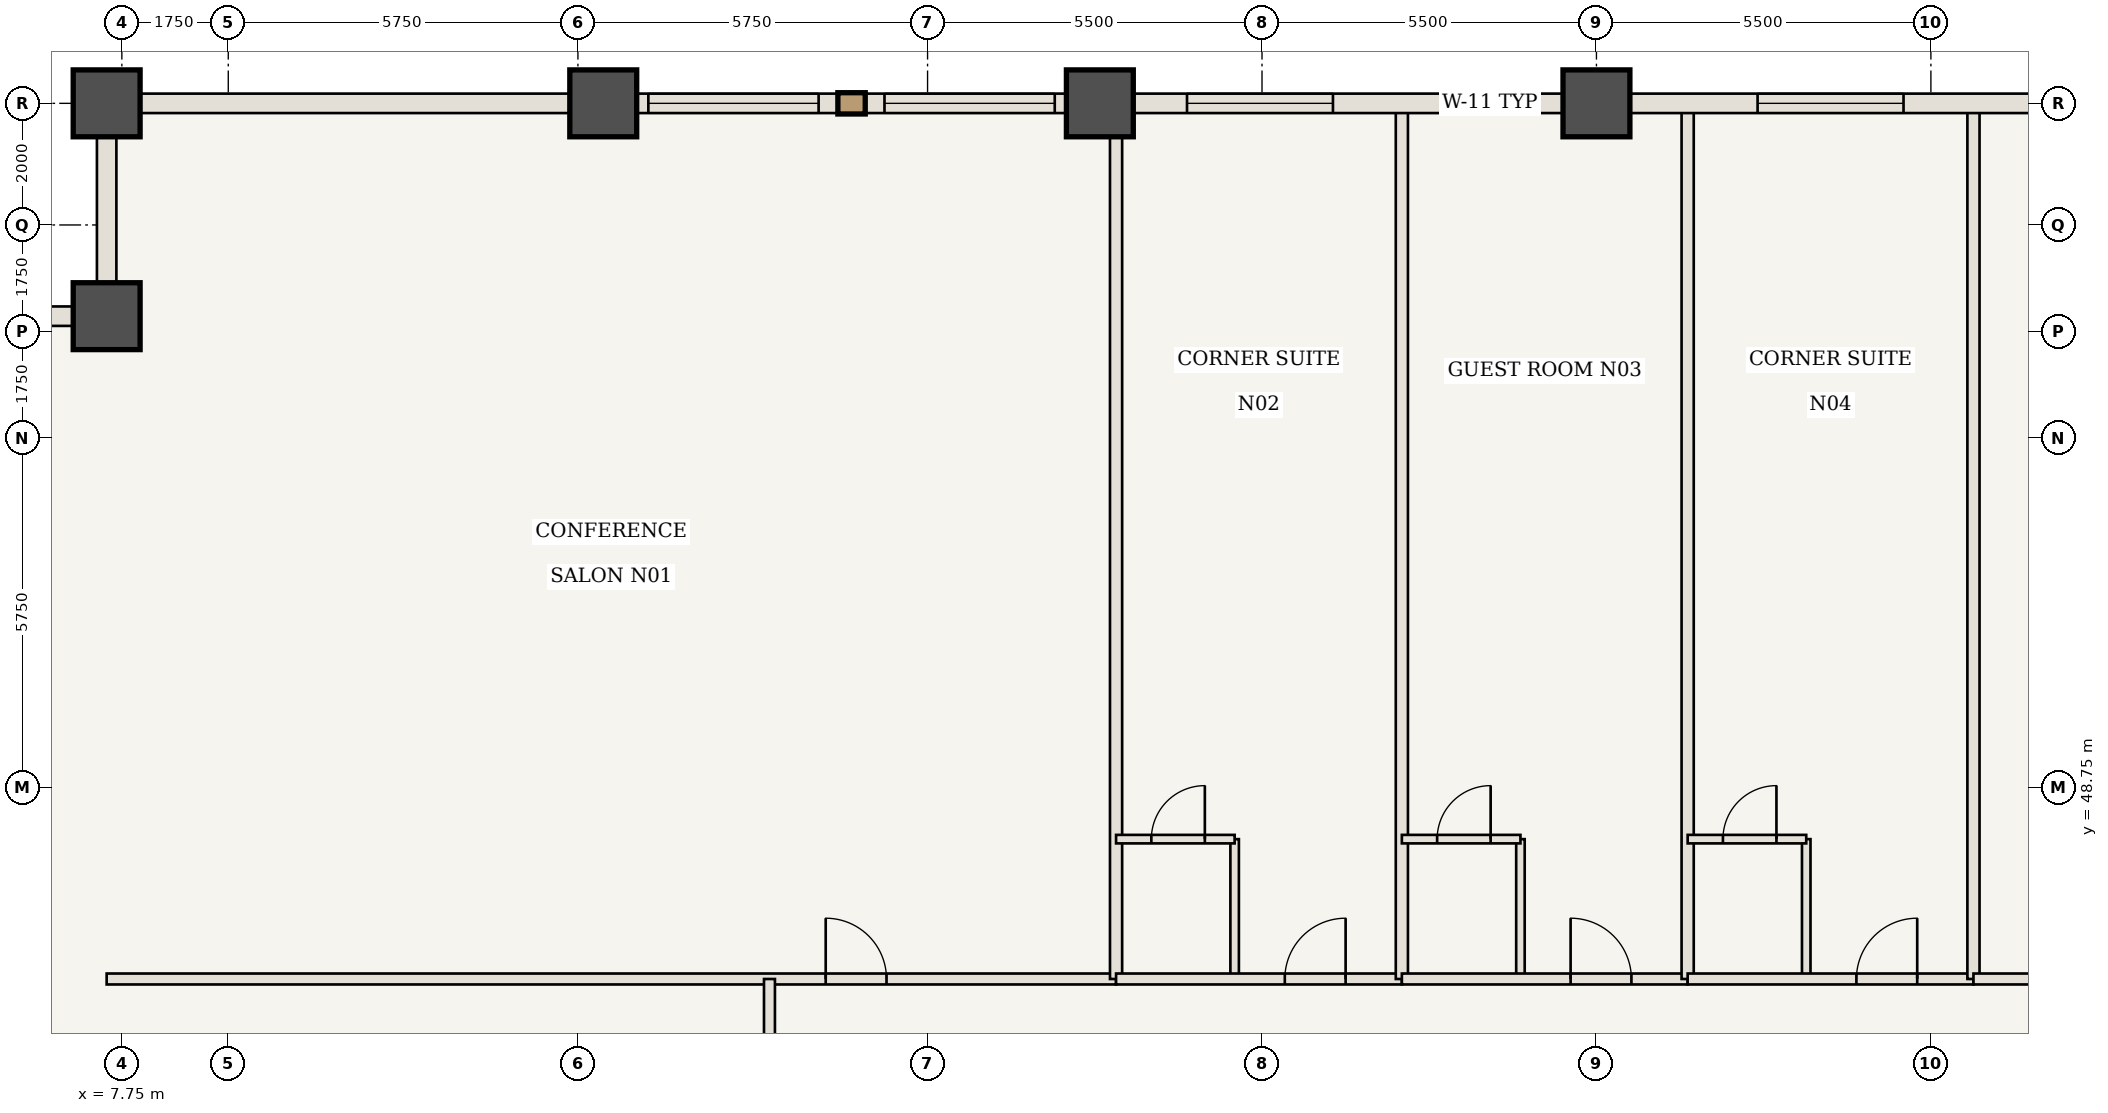
"""IFC4 building model, lengths in metres.
Left out: names, types, materials, properties, quantities, classifications, styles, units other than length and angle.
Written with IfcOpenShell. Run it as: python <this file> out.ifc"""

import sys

from ifc_helpers import new_model, si_unit, direction, frame, frame_2d, origin, origin_2d, place, context, subcontext, project, spatial, rectangle, extrude, element, fill, save


model = new_model("IFC4")
c1 = context("Model", 3, precision=1e-05, world=origin(), true_north=direction((0.0, 1.0)))
c2 = subcontext(c1, "Body", "Model", "MODEL_VIEW")
j1 = project(units=[si_unit("LENGTHUNIT", "METRE"), si_unit("PLANEANGLEUNIT", "RADIAN")], contexts=[c1])
p1 = place(None, origin())
s1 = spatial("IfcSite", under=j1, at=p1, CompositionType="ELEMENT")
p2 = place(p1, origin())
s2 = spatial("IfcBuilding", under=s1, at=p2, CompositionType="ELEMENT")
p3 = place(p2, frame((0.0, 0.0, 45.85)))
s3 = spatial("IfcBuildingStorey", under=s2, at=p3, CompositionType="ELEMENT", Elevation=45.85)
for number, where, z_axis, x_axis in (
    (1, (7.5, 60.0, 0.0), (0.0, 0.0, 1.0), (1.0, 0.0, 0.0)),
    (2, (7.5, 56.5, 0.0), (0.0, 0.0, 1.0), (1.0, 0.0, 0.0)),
    (3, (15.667, 60.0, 0.0), (0.0, 0.0, 1.0), (1.0, 0.0, 0.0)),
    (4, (23.833, 60.0, 0.0), (0.0, 0.0, 1.0), (1.0, 0.0, 0.0)),
    (5, (32.0, 60.0, 0.0), (0.0, 0.0, 1.0), (1.0, 0.0, 0.0)),
):
    element("IfcColumn", number, at=place(p3, frame(where, z_axis=z_axis, x_axis=x_axis)), inside=s3, PredefinedType="COLUMN", context=c2, shape_type="SweptSolid", body=[
        extrude(rectangle(XDim=1.1, YDim=1.1, at=origin_2d()), origin(), (0.0, 0.0, 1.0), 3.5),
    ])
p4 = place(p3, frame((7.5, 45.6, 0.0), z_axis=(0.0, 0.0, 1.0), x_axis=(1.0, 0.0, 0.0)))
e6 = element("IfcWall", 6, at=p4, inside=s3, PredefinedType="STANDARD", context=c2, shape_type="SweptSolid", body=[
    extrude(rectangle(XDim=16.6, YDim=0.18, at=frame_2d((8.3, 0.0))), origin(), (0.0, 0.0, 1.0), 3.32),
])
p5 = place(p4, frame((11.825, 0.0, 0.0)))
e7 = element("IfcOpeningElement", 7, at=p5, cuts=e6, PredefinedType="OPENING", context=c2, shape_type="SweptSolid", body=[
    extrude(rectangle(XDim=1.0, YDim=2.15, at=frame_2d((0.5, 1.075))), frame((0.0, 0.1, 0.0), z_axis=(0.0, -1.0, 0.0), x_axis=(1.0, 0.0, 0.0)), (0.0, 0.0, 1.0), 0.2),
])
p6 = place(p3, frame((24.1, 45.6, 0.0), z_axis=(0.0, 0.0, 1.0), x_axis=(0.0, 1.0, 0.0)))
e8 = element("IfcWall", 8, at=p6, inside=s3, PredefinedType="STANDARD", context=c2, shape_type="SweptSolid", body=[
    extrude(rectangle(XDim=14.34, YDim=0.2, at=frame_2d((7.17, 0.0))), origin(), (0.0, 0.0, 1.0), 3.32),
])
p7 = place(p3, frame((26.05, 45.6, 0.0), z_axis=(0.0, 0.0, 1.0), x_axis=(0.0, 1.0, 0.0)))
e9 = element("IfcWall", 9, at=p7, inside=s3, PredefinedType="STANDARD", context=c2, shape_type="SweptSolid", body=[
    extrude(rectangle(XDim=2.3, YDim=0.14, at=frame_2d((1.15, 0.0))), origin(), (0.0, 0.0, 1.0), 3.32),
])
p8 = place(p3, frame((24.1, 47.9, 0.0), z_axis=(0.0, 0.0, 1.0), x_axis=(1.0, 0.0, 0.0)))
e10 = element("IfcWall", 10, at=p8, inside=s3, PredefinedType="STANDARD", context=c2, shape_type="SweptSolid", body=[
    extrude(rectangle(XDim=1.95, YDim=0.14, at=frame_2d((0.975, 0.0))), origin(), (0.0, 0.0, 1.0), 3.32),
])
p9 = place(p8, frame((0.58, 0.0, 0.0)))
e11 = element("IfcOpeningElement", 11, at=p9, cuts=e10, PredefinedType="OPENING", context=c2, shape_type="SweptSolid", body=[
    extrude(rectangle(XDim=0.88, YDim=2.1, at=frame_2d((0.44, 1.05))), frame((0.0, 0.08, 0.0), z_axis=(0.0, -1.0, 0.0), x_axis=(1.0, 0.0, 0.0)), (0.0, 0.0, 1.0), 0.16),
])
p10 = place(p3, frame((24.1, 45.6, 0.0), z_axis=(0.0, 0.0, 1.0), x_axis=(1.0, 0.0, 0.0)))
e12 = element("IfcWall", 12, at=p10, inside=s3, PredefinedType="STANDARD", context=c2, shape_type="SweptSolid", body=[
    extrude(rectangle(XDim=4.7, YDim=0.18, at=frame_2d((2.35, 0.0))), origin(), (0.0, 0.0, 1.0), 3.32),
])
p11 = place(p10, frame((2.775, 0.0, 0.0)))
e13 = element("IfcOpeningElement", 13, at=p11, cuts=e12, PredefinedType="OPENING", context=c2, shape_type="SweptSolid", body=[
    extrude(rectangle(XDim=1.0, YDim=2.15, at=frame_2d((0.5, 1.075))), frame((0.0, 0.1, 0.0), z_axis=(0.0, -1.0, 0.0), x_axis=(1.0, 0.0, 0.0)), (0.0, 0.0, 1.0), 0.2),
])
p12 = place(p3, frame((28.8, 45.6, 0.0), z_axis=(0.0, 0.0, 1.0), x_axis=(0.0, 1.0, 0.0)))
e14 = element("IfcWall", 14, at=p12, inside=s3, PredefinedType="STANDARD", context=c2, shape_type="SweptSolid", body=[
    extrude(rectangle(XDim=14.34, YDim=0.2, at=frame_2d((7.17, 0.0))), origin(), (0.0, 0.0, 1.0), 3.32),
])
p13 = place(p3, frame((30.75, 45.6, 0.0), z_axis=(0.0, 0.0, 1.0), x_axis=(0.0, 1.0, 0.0)))
e15 = element("IfcWall", 15, at=p13, inside=s3, PredefinedType="STANDARD", context=c2, shape_type="SweptSolid", body=[
    extrude(rectangle(XDim=2.3, YDim=0.14, at=frame_2d((1.15, 0.0))), origin(), (0.0, 0.0, 1.0), 3.32),
])
p14 = place(p3, frame((28.8, 47.9, 0.0), z_axis=(0.0, 0.0, 1.0), x_axis=(1.0, 0.0, 0.0)))
e16 = element("IfcWall", 16, at=p14, inside=s3, PredefinedType="STANDARD", context=c2, shape_type="SweptSolid", body=[
    extrude(rectangle(XDim=1.95, YDim=0.14, at=frame_2d((0.975, 0.0))), origin(), (0.0, 0.0, 1.0), 3.32),
])
p15 = place(p14, frame((0.58, 0.0, 0.0)))
e17 = element("IfcOpeningElement", 17, at=p15, cuts=e16, PredefinedType="OPENING", context=c2, shape_type="SweptSolid", body=[
    extrude(rectangle(XDim=0.88, YDim=2.1, at=frame_2d((0.44, 1.05))), frame((0.0, 0.08, 0.0), z_axis=(0.0, -1.0, 0.0), x_axis=(1.0, 0.0, 0.0)), (0.0, 0.0, 1.0), 0.16),
])
p16 = place(p3, frame((28.8, 45.6, 0.0), z_axis=(0.0, 0.0, 1.0), x_axis=(1.0, 0.0, 0.0)))
e18 = element("IfcWall", 18, at=p16, inside=s3, PredefinedType="STANDARD", context=c2, shape_type="SweptSolid", body=[
    extrude(rectangle(XDim=4.7, YDim=0.18, at=frame_2d((2.35, 0.0))), origin(), (0.0, 0.0, 1.0), 3.32),
])
p17 = place(p16, frame((2.775, 0.0, 0.0)))
e19 = element("IfcOpeningElement", 19, at=p17, cuts=e18, PredefinedType="OPENING", context=c2, shape_type="SweptSolid", body=[
    extrude(rectangle(XDim=1.0, YDim=2.15, at=frame_2d((0.5, 1.075))), frame((0.0, 0.1, 0.0), z_axis=(0.0, -1.0, 0.0), x_axis=(1.0, 0.0, 0.0)), (0.0, 0.0, 1.0), 0.2),
])
p18 = place(p3, frame((33.5, 45.6, 0.0), z_axis=(0.0, 0.0, 1.0), x_axis=(0.0, 1.0, 0.0)))
e20 = element("IfcWall", 20, at=p18, inside=s3, PredefinedType="STANDARD", context=c2, shape_type="SweptSolid", body=[
    extrude(rectangle(XDim=14.34, YDim=0.2, at=frame_2d((7.17, 0.0))), origin(), (0.0, 0.0, 1.0), 3.32),
])
p19 = place(p3, frame((35.45, 45.6, 0.0), z_axis=(0.0, 0.0, 1.0), x_axis=(0.0, 1.0, 0.0)))
e21 = element("IfcWall", 21, at=p19, inside=s3, PredefinedType="STANDARD", context=c2, shape_type="SweptSolid", body=[
    extrude(rectangle(XDim=2.3, YDim=0.14, at=frame_2d((1.15, 0.0))), origin(), (0.0, 0.0, 1.0), 3.32),
])
p20 = place(p3, frame((33.5, 47.9, 0.0), z_axis=(0.0, 0.0, 1.0), x_axis=(1.0, 0.0, 0.0)))
e22 = element("IfcWall", 22, at=p20, inside=s3, PredefinedType="STANDARD", context=c2, shape_type="SweptSolid", body=[
    extrude(rectangle(XDim=1.95, YDim=0.14, at=frame_2d((0.975, 0.0))), origin(), (0.0, 0.0, 1.0), 3.32),
])
p21 = place(p20, frame((0.58, 0.0, 0.0)))
e23 = element("IfcOpeningElement", 23, at=p21, cuts=e22, PredefinedType="OPENING", context=c2, shape_type="SweptSolid", body=[
    extrude(rectangle(XDim=0.88, YDim=2.1, at=frame_2d((0.44, 1.05))), frame((0.0, 0.08, 0.0), z_axis=(0.0, -1.0, 0.0), x_axis=(1.0, 0.0, 0.0)), (0.0, 0.0, 1.0), 0.16),
])
p22 = place(p3, frame((33.5, 45.6, 0.0), z_axis=(0.0, 0.0, 1.0), x_axis=(1.0, 0.0, 0.0)))
e24 = element("IfcWall", 24, at=p22, inside=s3, PredefinedType="STANDARD", context=c2, shape_type="SweptSolid", body=[
    extrude(rectangle(XDim=4.7, YDim=0.18, at=frame_2d((2.35, 0.0))), origin(), (0.0, 0.0, 1.0), 3.32),
])
p23 = place(p22, frame((2.775, 0.0, 0.0)))
e25 = element("IfcOpeningElement", 25, at=p23, cuts=e24, PredefinedType="OPENING", context=c2, shape_type="SweptSolid", body=[
    extrude(rectangle(XDim=1.0, YDim=2.15, at=frame_2d((0.5, 1.075))), frame((0.0, 0.1, 0.0), z_axis=(0.0, -1.0, 0.0), x_axis=(1.0, 0.0, 0.0)), (0.0, 0.0, 1.0), 0.2),
])
p24 = place(p3, frame((38.2, 45.6, 0.0), z_axis=(0.0, 0.0, 1.0), x_axis=(0.0, 1.0, 0.0)))
e26 = element("IfcWall", 26, at=p24, inside=s3, PredefinedType="STANDARD", context=c2, shape_type="SweptSolid", body=[
    extrude(rectangle(XDim=14.34, YDim=0.2, at=frame_2d((7.17, 0.0))), origin(), (0.0, 0.0, 1.0), 3.32),
])
p25 = place(p3, frame((38.2, 45.6, 0.0), z_axis=(0.0, 0.0, 1.0), x_axis=(1.0, 0.0, 0.0)))
e27 = element("IfcWall", 27, at=p25, inside=s3, PredefinedType="STANDARD", context=c2, shape_type="SweptSolid", body=[
    extrude(rectangle(XDim=18.3, YDim=0.18, at=frame_2d((9.15, 0.0))), origin(), (0.0, 0.0, 1.0), 3.32),
])
p26 = place(p25, frame((4.625, 0.0, 0.0)))
e28 = element("IfcOpeningElement", 28, at=p26, cuts=e27, PredefinedType="OPENING", context=c2, shape_type="SweptSolid", body=[
    extrude(rectangle(XDim=1.0, YDim=2.15, at=frame_2d((0.5, 1.075))), frame((0.0, 0.1, 0.0), z_axis=(0.0, -1.0, 0.0), x_axis=(1.0, 0.0, 0.0)), (0.0, 0.0, 1.0), 0.2),
])
p27 = place(p3, frame((18.4, 41.9, 0.0), z_axis=(0.0, 0.0, 1.0), x_axis=(0.0, 1.0, 0.0)))
e29 = element("IfcWall", 29, at=p27, inside=s3, PredefinedType="STANDARD", context=c2, shape_type="SweptSolid", body=[
    extrude(rectangle(XDim=3.7, YDim=0.18, at=frame_2d((1.85, 0.0))), origin(), (0.0, 0.0, 1.0), 3.32),
])
p28 = place(p27, frame((1.35, 0.0, 0.0)))
e30 = element("IfcOpeningElement", 30, at=p28, cuts=e29, PredefinedType="OPENING", context=c2, shape_type="SweptSolid", body=[
    extrude(rectangle(XDim=1.0, YDim=2.15, at=frame_2d((0.5, 1.075))), frame((0.0, 0.1, 0.0), z_axis=(0.0, -1.0, 0.0), x_axis=(1.0, 0.0, 0.0)), (0.0, 0.0, 1.0), 0.2),
])
p29 = place(p3, frame((7.5, 60.0, 0.0), z_axis=(0.0, 0.0, 1.0), x_axis=(1.0, 0.0, 0.0)))
e31 = element("IfcWall", 31, at=p29, inside=s3, PredefinedType="USERDEFINED", context=c2, shape_type="SweptSolid", body=[
    extrude(rectangle(XDim=8.167, YDim=0.32, at=frame_2d((4.083, 0.0))), origin(), (0.0, 0.0, 1.0), 2.52),
])
p30 = place(p3, frame((15.667, 60.0, 0.0), z_axis=(0.0, 0.0, 1.0), x_axis=(1.0, 0.0, 0.0)))
e32 = element("IfcWall", 32, at=p30, inside=s3, PredefinedType="USERDEFINED", context=c2, shape_type="SweptSolid", body=[
    extrude(rectangle(XDim=8.167, YDim=0.32, at=frame_2d((4.083, 0.0))), origin(), (0.0, 0.0, 1.0), 2.52),
])
p31 = place(p30, frame((0.742, 0.0, 0.85)))
e33 = element("IfcOpeningElement", 33, at=p31, cuts=e32, PredefinedType="OPENING", context=c2, shape_type="SweptSolid", body=[
    extrude(rectangle(XDim=2.8, YDim=1.47, at=frame_2d((1.4, 0.735))), frame((0.0, 0.17, 0.0), z_axis=(0.0, -1.0, 0.0), x_axis=(1.0, 0.0, 0.0)), (0.0, 0.0, 1.0), 0.34),
])
p32 = place(p30, frame((4.625, 0.0, 0.85)))
e34 = element("IfcOpeningElement", 34, at=p32, cuts=e32, PredefinedType="OPENING", context=c2, shape_type="SweptSolid", body=[
    extrude(rectangle(XDim=2.8, YDim=1.47, at=frame_2d((1.4, 0.735))), frame((0.0, 0.17, 0.0), z_axis=(0.0, -1.0, 0.0), x_axis=(1.0, 0.0, 0.0)), (0.0, 0.0, 1.0), 0.34),
])
p33 = place(p3, frame((23.833, 60.0, 0.0), z_axis=(0.0, 0.0, 1.0), x_axis=(1.0, 0.0, 0.0)))
e35 = element("IfcWall", 35, at=p33, inside=s3, PredefinedType="USERDEFINED", context=c2, shape_type="SweptSolid", body=[
    extrude(rectangle(XDim=8.167, YDim=0.32, at=frame_2d((4.083, 0.0))), origin(), (0.0, 0.0, 1.0), 2.52),
])
p34 = place(p33, frame((1.433, 0.0, 0.85)))
e36 = element("IfcOpeningElement", 36, at=p34, cuts=e35, PredefinedType="OPENING", context=c2, shape_type="SweptSolid", body=[
    extrude(rectangle(XDim=2.4, YDim=1.47, at=frame_2d((1.2, 0.735))), frame((0.0, 0.17, 0.0), z_axis=(0.0, -1.0, 0.0), x_axis=(1.0, 0.0, 0.0)), (0.0, 0.0, 1.0), 0.34),
])
p35 = place(p33, frame((5.617, 0.0, 0.85)))
e37 = element("IfcOpeningElement", 37, at=p35, cuts=e35, PredefinedType="OPENING", context=c2, shape_type="SweptSolid", body=[
    extrude(rectangle(XDim=1.6, YDim=1.47, at=frame_2d((0.8, 0.735))), frame((0.0, 0.17, 0.0), z_axis=(0.0, -1.0, 0.0), x_axis=(1.0, 0.0, 0.0)), (0.0, 0.0, 1.0), 0.34),
])
p36 = place(p3, frame((32.0, 60.0, 0.0), z_axis=(0.0, 0.0, 1.0), x_axis=(1.0, 0.0, 0.0)))
e38 = element("IfcWall", 38, at=p36, inside=s3, PredefinedType="USERDEFINED", context=c2, shape_type="SweptSolid", body=[
    extrude(rectangle(XDim=8.167, YDim=0.32, at=frame_2d((4.083, 0.0))), origin(), (0.0, 0.0, 1.0), 2.52),
])
p37 = place(p36, frame((2.65, 0.0, 0.85)))
e39 = element("IfcOpeningElement", 39, at=p37, cuts=e38, PredefinedType="OPENING", context=c2, shape_type="SweptSolid", body=[
    extrude(rectangle(XDim=2.4, YDim=1.47, at=frame_2d((1.2, 0.735))), frame((0.0, 0.17, 0.0), z_axis=(0.0, -1.0, 0.0), x_axis=(1.0, 0.0, 0.0)), (0.0, 0.0, 1.0), 0.34),
])
for number, where, z_axis, x_axis in (
    (40, (7.5, 56.5, 0.0), (0.0, 0.0, 1.0), (0.0, 1.0, 0.0)),
    (41, (4.0, 56.5, 0.0), (0.0, 0.0, 1.0), (1.0, 0.0, 0.0)),
):
    element("IfcWall", number, at=place(p3, frame(where, z_axis=z_axis, x_axis=x_axis)), inside=s3, PredefinedType="USERDEFINED", context=c2, shape_type="SweptSolid", body=[
        extrude(rectangle(XDim=3.5, YDim=0.32, at=frame_2d((1.75, 0.0))), origin(), (0.0, 0.0, 1.0), 2.52),
    ])
p38 = place(p5, origin())
e42 = element("IfcDoor", 42, at=p38, inside=s3, OperationType="SINGLE_SWING_LEFT", PredefinedType="DOOR", context=c2, shape_type="SweptSolid", body=[
    extrude(rectangle(XDim=1.0, YDim=2.15, at=frame_2d((0.5, 1.075))), frame((0.0, 0.025, 0.0), z_axis=(0.0, -1.0, 0.0), x_axis=(1.0, 0.0, 0.0)), (0.0, 0.0, 1.0), 0.05),
])
fill(e7, e42)
p39 = place(p9, origin())
e43 = element("IfcDoor", 43, at=p39, inside=s3, OperationType="SINGLE_SWING_RIGHT", PredefinedType="DOOR", context=c2, shape_type="SweptSolid", body=[
    extrude(rectangle(XDim=0.88, YDim=2.1, at=frame_2d((0.44, 1.05))), frame((0.0, 0.025, 0.0), z_axis=(0.0, -1.0, 0.0), x_axis=(1.0, 0.0, 0.0)), (0.0, 0.0, 1.0), 0.05),
])
fill(e11, e43)
p40 = place(p11, origin())
e44 = element("IfcDoor", 44, at=p40, inside=s3, OperationType="SINGLE_SWING_RIGHT", PredefinedType="DOOR", context=c2, shape_type="SweptSolid", body=[
    extrude(rectangle(XDim=1.0, YDim=2.15, at=frame_2d((0.5, 1.075))), frame((0.0, 0.025, 0.0), z_axis=(0.0, -1.0, 0.0), x_axis=(1.0, 0.0, 0.0)), (0.0, 0.0, 1.0), 0.05),
])
fill(e13, e44)
p41 = place(p15, origin())
e45 = element("IfcDoor", 45, at=p41, inside=s3, OperationType="SINGLE_SWING_RIGHT", PredefinedType="DOOR", context=c2, shape_type="SweptSolid", body=[
    extrude(rectangle(XDim=0.88, YDim=2.1, at=frame_2d((0.44, 1.05))), frame((0.0, 0.025, 0.0), z_axis=(0.0, -1.0, 0.0), x_axis=(1.0, 0.0, 0.0)), (0.0, 0.0, 1.0), 0.05),
])
fill(e17, e45)
p42 = place(p17, origin())
e46 = element("IfcDoor", 46, at=p42, inside=s3, OperationType="SINGLE_SWING_LEFT", PredefinedType="DOOR", context=c2, shape_type="SweptSolid", body=[
    extrude(rectangle(XDim=1.0, YDim=2.15, at=frame_2d((0.5, 1.075))), frame((0.0, 0.025, 0.0), z_axis=(0.0, -1.0, 0.0), x_axis=(1.0, 0.0, 0.0)), (0.0, 0.0, 1.0), 0.05),
])
fill(e19, e46)
p43 = place(p21, origin())
e47 = element("IfcDoor", 47, at=p43, inside=s3, OperationType="SINGLE_SWING_RIGHT", PredefinedType="DOOR", context=c2, shape_type="SweptSolid", body=[
    extrude(rectangle(XDim=0.88, YDim=2.1, at=frame_2d((0.44, 1.05))), frame((0.0, 0.025, 0.0), z_axis=(0.0, -1.0, 0.0), x_axis=(1.0, 0.0, 0.0)), (0.0, 0.0, 1.0), 0.05),
])
fill(e23, e47)
p44 = place(p23, origin())
e48 = element("IfcDoor", 48, at=p44, inside=s3, OperationType="SINGLE_SWING_RIGHT", PredefinedType="DOOR", context=c2, shape_type="SweptSolid", body=[
    extrude(rectangle(XDim=1.0, YDim=2.15, at=frame_2d((0.5, 1.075))), frame((0.0, 0.025, 0.0), z_axis=(0.0, -1.0, 0.0), x_axis=(1.0, 0.0, 0.0)), (0.0, 0.0, 1.0), 0.05),
])
fill(e25, e48)
p45 = place(p31, origin())
e49 = element("IfcWindow", 49, at=p45, inside=s3, PartitioningType="SINGLE_PANEL", PredefinedType="WINDOW", context=c2, shape_type="SweptSolid", body=[
    extrude(rectangle(XDim=2.8, YDim=1.47, at=frame_2d((1.4, 0.735))), frame((0.0, 0.03, 0.0), z_axis=(0.0, -1.0, 0.0), x_axis=(1.0, 0.0, 0.0)), (0.0, 0.0, 1.0), 0.06),
])
fill(e33, e49)
p46 = place(p32, origin())
e50 = element("IfcWindow", 50, at=p46, inside=s3, PartitioningType="SINGLE_PANEL", PredefinedType="WINDOW", context=c2, shape_type="SweptSolid", body=[
    extrude(rectangle(XDim=2.8, YDim=1.47, at=frame_2d((1.4, 0.735))), frame((0.0, 0.03, 0.0), z_axis=(0.0, -1.0, 0.0), x_axis=(1.0, 0.0, 0.0)), (0.0, 0.0, 1.0), 0.06),
])
fill(e34, e50)
p47 = place(p34, origin())
e51 = element("IfcWindow", 51, at=p47, inside=s3, PartitioningType="SINGLE_PANEL", PredefinedType="WINDOW", context=c2, shape_type="SweptSolid", body=[
    extrude(rectangle(XDim=2.4, YDim=1.47, at=frame_2d((1.2, 0.735))), frame((0.0, 0.03, 0.0), z_axis=(0.0, -1.0, 0.0), x_axis=(1.0, 0.0, 0.0)), (0.0, 0.0, 1.0), 0.06),
])
fill(e36, e51)
p48 = place(p35, origin())
e52 = element("IfcWindow", 52, at=p48, inside=s3, PartitioningType="SINGLE_PANEL", PredefinedType="WINDOW", context=c2, shape_type="SweptSolid", body=[
    extrude(rectangle(XDim=1.6, YDim=1.47, at=frame_2d((0.8, 0.735))), frame((0.0, 0.03, 0.0), z_axis=(0.0, -1.0, 0.0), x_axis=(1.0, 0.0, 0.0)), (0.0, 0.0, 1.0), 0.06),
])
fill(e37, e52)
p49 = place(p37, origin())
e53 = element("IfcWindow", 53, at=p49, inside=s3, PartitioningType="SINGLE_PANEL", PredefinedType="WINDOW", context=c2, shape_type="SweptSolid", body=[
    extrude(rectangle(XDim=2.4, YDim=1.47, at=frame_2d((1.2, 0.735))), frame((0.0, 0.03, 0.0), z_axis=(0.0, -1.0, 0.0), x_axis=(1.0, 0.0, 0.0)), (0.0, 0.0, 1.0), 0.06),
])
fill(e39, e53)
save(model, sys.argv[1])
